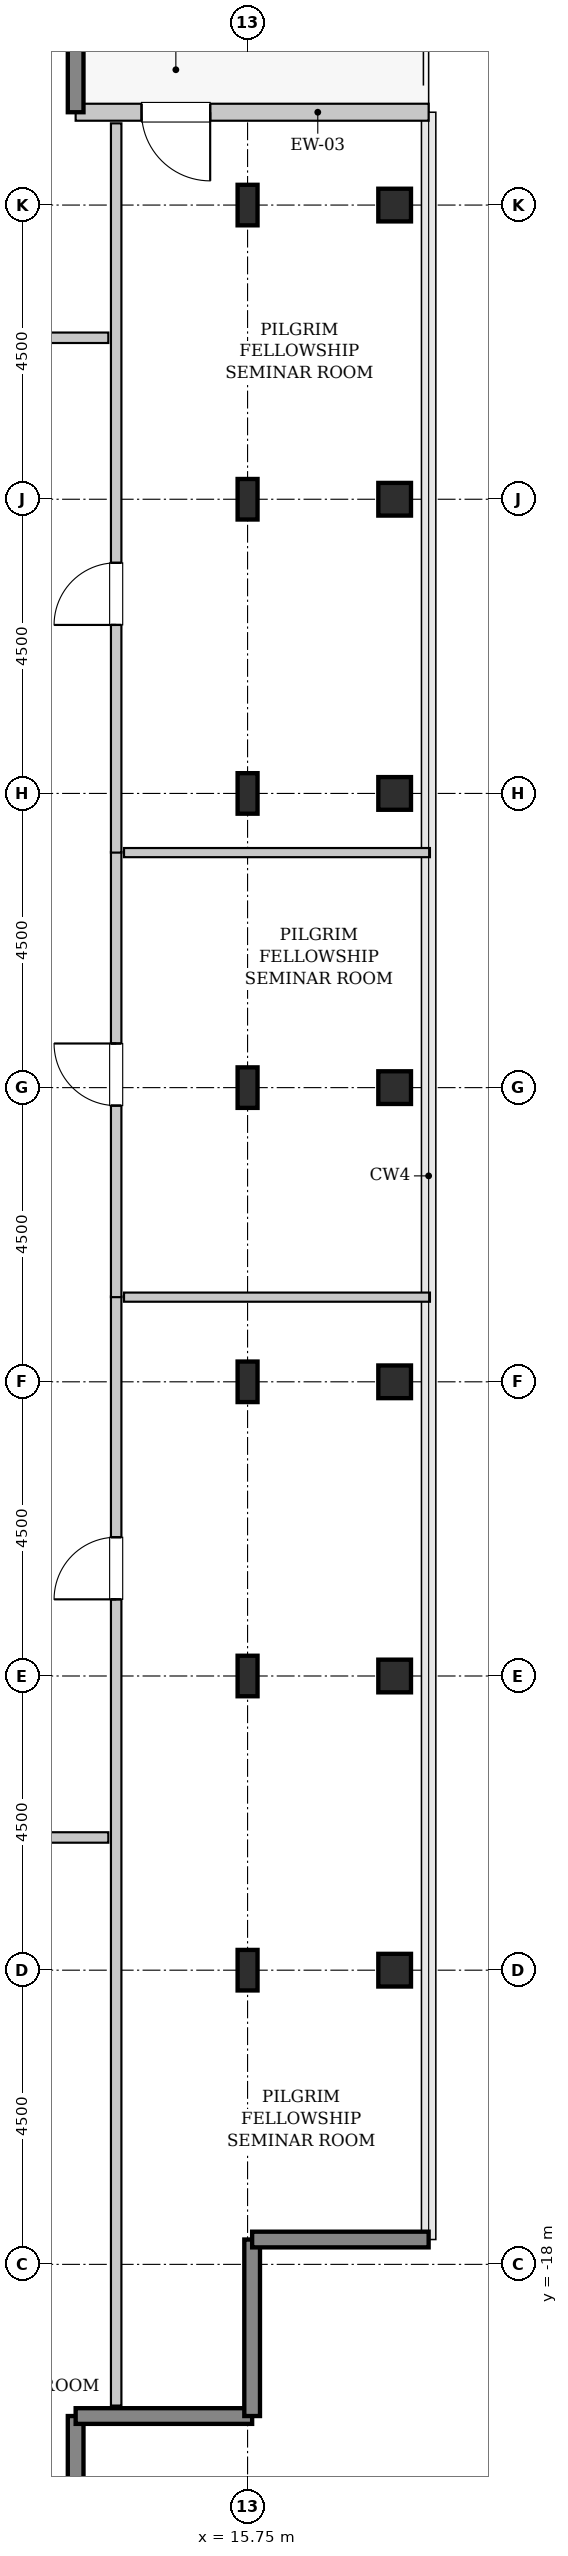
"""IFC4 building model, lengths in metres.
Left out: names, types, materials, properties, quantities, classifications, styles, units other than length and angle.
Written with IfcOpenShell. Run it as: python <this file> out.ifc"""

import sys

from ifc_helpers import new_model, si_unit, direction, frame, frame_2d, origin, origin_2d, place, context, subcontext, project, spatial, rectangle, hollow_rectangle, i_section, extrude, source, transform, mapped, element, fill, save


model = new_model("IFC4")
c1 = context("Model", 3, precision=1e-05, world=origin(), true_north=direction((0.0, 1.0)))
c2 = subcontext(c1, "Body", "Model", "MODEL_VIEW")
j1 = project(units=[si_unit("LENGTHUNIT", "METRE"), si_unit("PLANEANGLEUNIT", "RADIAN")], contexts=[c1])
p1 = place(None, origin())
s1 = spatial("IfcSite", under=j1, at=p1, CompositionType="ELEMENT")
p2 = place(p1, origin())
s2 = spatial("IfcBuilding", under=s1, at=p2, CompositionType="ELEMENT")
p3 = place(p2, frame((0.0, 0.0, 337.6)))
s3 = spatial("IfcBuildingStorey", under=s2, at=p3, CompositionType="ELEMENT", Elevation=337.6)
m1 = source(origin(), c2, "Body", "SweptSolid", [
    extrude(i_section(OverallWidth=0.305, OverallDepth=0.62, WebThickness=0.021, FlangeThickness=0.04, FilletRadius=0.027, at=origin_2d()), origin(), (0.0, 0.0, 1.0), 3.8),
])
for number, where, z_axis, x_axis in (
    (1, (15.75, -13.5, 0.0), (0.0, 0.0, 1.0), (1.0, 0.0, 0.0)),
    (2, (15.75, -9.0, 0.0), (0.0, 0.0, 1.0), (1.0, 0.0, 0.0)),
    (3, (15.75, -4.5, 0.0), (0.0, 0.0, 1.0), (1.0, 0.0, 0.0)),
    (4, (15.75, 0.0, 0.0), (0.0, 0.0, 1.0), (1.0, 0.0, 0.0)),
    (5, (15.75, 4.5, 0.0), (0.0, 0.0, 1.0), (1.0, 0.0, 0.0)),
    (6, (15.75, 9.0, 0.0), (0.0, 0.0, 1.0), (1.0, 0.0, 0.0)),
    (7, (15.75, 13.5, 0.0), (0.0, 0.0, 1.0), (1.0, 0.0, 0.0)),
):
    element("IfcColumn", number, at=place(p3, frame(where, z_axis=z_axis, x_axis=x_axis)), inside=s3, PredefinedType="COLUMN", context=c2, shape_type="MappedRepresentation", body=[
        mapped(m1, transform((0.0, 0.0, 0.0), x_axis=(1.0, 0.0, 0.0), y_axis=(0.0, 1.0, 0.0), z_axis=(0.0, 0.0, 1.0), scale=1.0)),
    ])
m2 = source(origin(), c2, "Body", "SweptSolid", [
    extrude(hollow_rectangle(XDim=0.5, YDim=0.5, WallThickness=0.025, InnerFilletRadius=0.025, OuterFilletRadius=0.05, at=origin_2d()), origin(), (0.0, 0.0, 1.0), 3.8),
])
for number, where, z_axis, x_axis in (
    (8, (18.0, -13.5, 0.0), (0.0, 0.0, 1.0), (1.0, 0.0, 0.0)),
    (9, (18.0, -9.0, 0.0), (0.0, 0.0, 1.0), (1.0, 0.0, 0.0)),
    (10, (18.0, -4.5, 0.0), (0.0, 0.0, 1.0), (1.0, 0.0, 0.0)),
    (11, (18.0, 0.0, 0.0), (0.0, 0.0, 1.0), (1.0, 0.0, 0.0)),
    (12, (18.0, 4.5, 0.0), (0.0, 0.0, 1.0), (1.0, 0.0, 0.0)),
    (13, (18.0, 9.0, 0.0), (0.0, 0.0, 1.0), (1.0, 0.0, 0.0)),
    (14, (18.0, 13.5, 0.0), (0.0, 0.0, 1.0), (1.0, 0.0, 0.0)),
):
    element("IfcColumn", number, at=place(p3, frame(where, z_axis=z_axis, x_axis=x_axis)), inside=s3, PredefinedType="COLUMN", context=c2, shape_type="MappedRepresentation", body=[
        mapped(m2, transform((0.0, 0.0, 0.0), x_axis=(1.0, 0.0, 0.0), y_axis=(0.0, 1.0, 0.0), z_axis=(0.0, 0.0, 1.0), scale=1.0)),
    ])
m3 = source(origin(), c2, "Body", "SweptSolid", [
    extrude(rectangle(XDim=5.4, YDim=0.26, at=frame_2d((2.7, 0.0))), origin(), (0.0, 0.0, 1.0), 3.55),
])
p4 = place(p3, frame((18.52, 14.92, 0.0), z_axis=(0.0, 0.0, 1.0), x_axis=(-1.0, 0.0, 0.0)))
e15 = element("IfcWall", 15, at=p4, inside=s3, PredefinedType="SOLIDWALL", context=c2, shape_type="MappedRepresentation", body=[
    mapped(m3, transform((0.0, 0.0, 0.0), x_axis=(1.0, 0.0, 0.0), y_axis=(0.0, 1.0, 0.0), z_axis=(0.0, 0.0, 1.0), scale=1.0)),
])
p5 = place(p4, frame((3.342, 0.0, 0.0)))
e16 = element("IfcOpeningElement", 16, at=p5, cuts=e15, PredefinedType="OPENING", context=c2, shape_type="SweptSolid", body=[
    extrude(rectangle(XDim=1.05, YDim=2.2, at=frame_2d((0.525, 1.1))), frame((0.0, 0.14, 0.0), z_axis=(0.0, -1.0, 0.0), x_axis=(1.0, 0.0, 0.0)), (0.0, 0.0, 1.0), 0.28),
])
m4 = source(origin(), c2, "Body", "SweptSolid", [
    extrude(rectangle(XDim=2.7, YDim=0.24, at=frame_2d((1.35, 0.0))), origin(), (0.0, 0.0, 1.0), 3.55),
])
p6 = place(p3, frame((13.12, 14.92, 0.0), z_axis=(0.0, 0.0, 1.0), x_axis=(0.0, 1.0, 0.0)))
e17 = element("IfcWall", 17, at=p6, inside=s3, PredefinedType="SHEAR", context=c2, shape_type="MappedRepresentation", body=[
    mapped(m4, transform((0.0, 0.0, 0.0), x_axis=(1.0, 0.0, 0.0), y_axis=(0.0, 1.0, 0.0), z_axis=(0.0, 0.0, 1.0), scale=1.0)),
])
m5 = source(origin(), c2, "Body", "SweptSolid", [
    extrude(rectangle(XDim=2.7, YDim=0.24, at=frame_2d((1.35, 0.0))), origin(), (0.0, 0.0, 1.0), 3.55),
])
for number, where, z_axis, x_axis in (
    (18, (13.12, -23.02, 0.0), (0.0, 0.0, 1.0), (0.0, 1.0, 0.0)),
    (19, (13.12, -20.32, 0.0), (0.0, 0.0, 1.0), (1.0, 0.0, 0.0)),
    (20, (15.82, -20.32, 0.0), (0.0, 0.0, 1.0), (0.0, 1.0, 0.0)),
    (21, (15.82, -17.62, 0.0), (0.0, 0.0, 1.0), (1.0, 0.0, 0.0)),
):
    element("IfcWall", number, at=place(p3, frame(where, z_axis=z_axis, x_axis=x_axis)), inside=s3, PredefinedType="SHEAR", context=c2, shape_type="MappedRepresentation", body=[
        mapped(m5, transform((0.0, 0.0, 0.0), x_axis=(1.0, 0.0, 0.0), y_axis=(0.0, 1.0, 0.0), z_axis=(0.0, 0.0, 1.0), scale=1.0)),
    ])
m6 = source(origin(), c2, "Body", "SweptSolid", [
    extrude(rectangle(XDim=16.965, YDim=0.16, at=frame_2d((8.482, 0.0))), origin(), (0.0, 0.0, 1.0), 3.535),
])
p7 = place(p3, frame((13.74, -20.16, 0.0), z_axis=(0.0, 0.0, 1.0), x_axis=(0.0, 1.0, 0.0)))
e22 = element("IfcWall", 22, at=p7, inside=s3, PredefinedType="PARTITIONING", context=c2, shape_type="MappedRepresentation", body=[
    mapped(m6, transform((0.0, 0.0, 0.0), x_axis=(1.0, 0.0, 0.0), y_axis=(0.0, 1.0, 0.0), z_axis=(0.0, 0.0, 1.0), scale=1.0)),
])
p8 = place(p7, frame((12.333, 0.0, 0.0)))
e23 = element("IfcOpeningElement", 23, at=p8, cuts=e22, PredefinedType="OPENING", context=c2, shape_type="SweptSolid", body=[
    extrude(rectangle(XDim=0.95, YDim=2.1, at=frame_2d((0.475, 1.05))), frame((0.0, 0.09, 0.0), z_axis=(0.0, -1.0, 0.0), x_axis=(1.0, 0.0, 0.0)), (0.0, 0.0, 1.0), 0.18),
])
m7 = source(origin(), c2, "Body", "SweptSolid", [
    extrude(rectangle(XDim=4.68, YDim=0.14, at=frame_2d((2.34, 0.0))), origin(), (0.0, 0.0, 1.0), 3.535),
])
p9 = place(p3, frame((13.86, -3.205, 0.0), z_axis=(0.0, 0.0, 1.0), x_axis=(1.0, 0.0, 0.0)))
e24 = element("IfcWall", 24, at=p9, inside=s3, PredefinedType="PARTITIONING", context=c2, shape_type="MappedRepresentation", body=[
    mapped(m7, transform((0.0, 0.0, 0.0), x_axis=(1.0, 0.0, 0.0), y_axis=(0.0, 1.0, 0.0), z_axis=(0.0, 0.0, 1.0), scale=1.0)),
])
m8 = source(origin(), c2, "Body", "SweptSolid", [
    extrude(rectangle(XDim=6.81, YDim=0.16, at=frame_2d((3.405, 0.0))), origin(), (0.0, 0.0, 1.0), 3.535),
])
p10 = place(p3, frame((13.74, -3.205, 0.0), z_axis=(0.0, 0.0, 1.0), x_axis=(0.0, 1.0, 0.0)))
e25 = element("IfcWall", 25, at=p10, inside=s3, PredefinedType="PARTITIONING", context=c2, shape_type="MappedRepresentation", body=[
    mapped(m8, transform((0.0, 0.0, 0.0), x_axis=(1.0, 0.0, 0.0), y_axis=(0.0, 1.0, 0.0), z_axis=(0.0, 0.0, 1.0), scale=1.0)),
])
p11 = place(p10, frame((2.93, 0.0, 0.0)))
e26 = element("IfcOpeningElement", 26, at=p11, cuts=e25, PredefinedType="OPENING", context=c2, shape_type="SweptSolid", body=[
    extrude(rectangle(XDim=0.95, YDim=2.1, at=frame_2d((0.475, 1.05))), frame((0.0, 0.09, 0.0), z_axis=(0.0, -1.0, 0.0), x_axis=(1.0, 0.0, 0.0)), (0.0, 0.0, 1.0), 0.18),
])
p12 = place(p3, frame((13.86, 3.595, 0.0), z_axis=(0.0, 0.0, 1.0), x_axis=(1.0, 0.0, 0.0)))
e27 = element("IfcWall", 27, at=p12, inside=s3, PredefinedType="PARTITIONING", context=c2, shape_type="MappedRepresentation", body=[
    mapped(m7, transform((0.0, 0.0, 0.0), x_axis=(1.0, 0.0, 0.0), y_axis=(0.0, 1.0, 0.0), z_axis=(0.0, 0.0, 1.0), scale=1.0)),
])
m9 = source(origin(), c2, "Body", "SweptSolid", [
    extrude(rectangle(XDim=11.155, YDim=0.16, at=frame_2d((5.578, 0.0))), origin(), (0.0, 0.0, 1.0), 3.535),
])
p13 = place(p3, frame((13.74, 3.595, 0.0), z_axis=(0.0, 0.0, 1.0), x_axis=(0.0, 1.0, 0.0)))
e28 = element("IfcWall", 28, at=p13, inside=s3, PredefinedType="PARTITIONING", context=c2, shape_type="MappedRepresentation", body=[
    mapped(m9, transform((0.0, 0.0, 0.0), x_axis=(1.0, 0.0, 0.0), y_axis=(0.0, 1.0, 0.0), z_axis=(0.0, 0.0, 1.0), scale=1.0)),
])
p14 = place(p13, frame((3.482, 0.0, 0.0)))
e29 = element("IfcOpeningElement", 29, at=p14, cuts=e28, PredefinedType="OPENING", context=c2, shape_type="SweptSolid", body=[
    extrude(rectangle(XDim=0.95, YDim=2.1, at=frame_2d((0.475, 1.05))), frame((0.0, 0.09, 0.0), z_axis=(0.0, -1.0, 0.0), x_axis=(1.0, 0.0, 0.0)), (0.0, 0.0, 1.0), 0.18),
])
m10 = source(origin(), c2, "Body", "SweptSolid", [
    extrude(rectangle(XDim=7.66, YDim=0.16, at=frame_2d((3.83, 0.0))), origin(), (0.0, 0.0, 1.0), 3.535),
])
p15 = place(p3, frame((5.96, 11.47, 0.0), z_axis=(0.0, 0.0, 1.0), x_axis=(1.0, 0.0, 0.0)))
e30 = element("IfcWall", 30, at=p15, inside=s3, PredefinedType="PARTITIONING", context=c2, shape_type="MappedRepresentation", body=[
    mapped(m10, transform((0.0, 0.0, 0.0), x_axis=(1.0, 0.0, 0.0), y_axis=(0.0, 1.0, 0.0), z_axis=(0.0, 0.0, 1.0), scale=1.0)),
])
p16 = place(p15, frame((3.355, 0.0, 0.0)))
e31 = element("IfcOpeningElement", 31, at=p16, cuts=e30, PredefinedType="OPENING", context=c2, shape_type="SweptSolid", body=[
    extrude(rectangle(XDim=0.95, YDim=2.1, at=frame_2d((0.475, 1.05))), frame((0.0, 0.09, 0.0), z_axis=(0.0, -1.0, 0.0), x_axis=(1.0, 0.0, 0.0)), (0.0, 0.0, 1.0), 0.18),
])
m11 = source(origin(), c2, "Body", "SweptSolid", [
    extrude(rectangle(XDim=4.66, YDim=0.16, at=frame_2d((2.33, 0.0))), origin(), (0.0, 0.0, 1.0), 3.535),
])
p17 = place(p3, frame((8.96, -11.47, 0.0), z_axis=(0.0, 0.0, 1.0), x_axis=(1.0, 0.0, 0.0)))
e32 = element("IfcWall", 32, at=p17, inside=s3, PredefinedType="PARTITIONING", context=c2, shape_type="MappedRepresentation", body=[
    mapped(m11, transform((0.0, 0.0, 0.0), x_axis=(1.0, 0.0, 0.0), y_axis=(0.0, 1.0, 0.0), z_axis=(0.0, 0.0, 1.0), scale=1.0)),
])
p18 = place(p17, frame((1.855, 0.0, 0.0)))
e33 = element("IfcOpeningElement", 33, at=p18, cuts=e32, PredefinedType="OPENING", context=c2, shape_type="SweptSolid", body=[
    extrude(rectangle(XDim=0.95, YDim=2.1, at=frame_2d((0.475, 1.05))), frame((0.0, 0.09, 0.0), z_axis=(0.0, -1.0, 0.0), x_axis=(1.0, 0.0, 0.0)), (0.0, 0.0, 1.0), 0.18),
])
m12 = source(origin(), c2, "Body", "SweptSolid", [
    extrude(rectangle(XDim=1.05, YDim=2.2, at=frame_2d((0.525, 1.1))), frame((0.0, 0.025, 0.0), z_axis=(0.0, -1.0, 0.0), x_axis=(1.0, 0.0, 0.0)), (0.0, 0.0, 1.0), 0.05),
])
p19 = place(p5, origin())
e34 = element("IfcDoor", 34, at=p19, inside=s3, OperationType="SINGLE_SWING_LEFT", PredefinedType="DOOR", context=c2, shape_type="MappedRepresentation", body=[
    mapped(m12, transform((0.0, 0.0, 0.0), x_axis=(1.0, 0.0, 0.0), y_axis=(0.0, 1.0, 0.0), z_axis=(0.0, 0.0, 1.0), scale=1.0)),
])
fill(e16, e34)
m13 = source(origin(), c2, "Body", "SweptSolid", [
    extrude(rectangle(XDim=0.95, YDim=2.1, at=frame_2d((0.475, 1.05))), frame((0.0, 0.025, 0.0), z_axis=(0.0, -1.0, 0.0), x_axis=(1.0, 0.0, 0.0)), (0.0, 0.0, 1.0), 0.05),
])
p20 = place(p8, origin())
e35 = element("IfcDoor", 35, at=p20, inside=s3, OperationType="SINGLE_SWING_LEFT", PredefinedType="DOOR", context=c2, shape_type="MappedRepresentation", body=[
    mapped(m13, transform((0.0, 0.0, 0.0), x_axis=(1.0, 0.0, 0.0), y_axis=(0.0, 1.0, 0.0), z_axis=(0.0, 0.0, 1.0), scale=1.0)),
])
fill(e23, e35)
p21 = place(p11, origin())
e36 = element("IfcDoor", 36, at=p21, inside=s3, OperationType="SINGLE_SWING_RIGHT", PredefinedType="DOOR", context=c2, shape_type="MappedRepresentation", body=[
    mapped(m13, transform((0.0, 0.0, 0.0), x_axis=(1.0, 0.0, 0.0), y_axis=(0.0, 1.0, 0.0), z_axis=(0.0, 0.0, 1.0), scale=1.0)),
])
fill(e26, e36)
p22 = place(p14, origin())
e37 = element("IfcDoor", 37, at=p22, inside=s3, OperationType="SINGLE_SWING_LEFT", PredefinedType="DOOR", context=c2, shape_type="MappedRepresentation", body=[
    mapped(m13, transform((0.0, 0.0, 0.0), x_axis=(1.0, 0.0, 0.0), y_axis=(0.0, 1.0, 0.0), z_axis=(0.0, 0.0, 1.0), scale=1.0)),
])
fill(e29, e37)
save(model, sys.argv[1])
